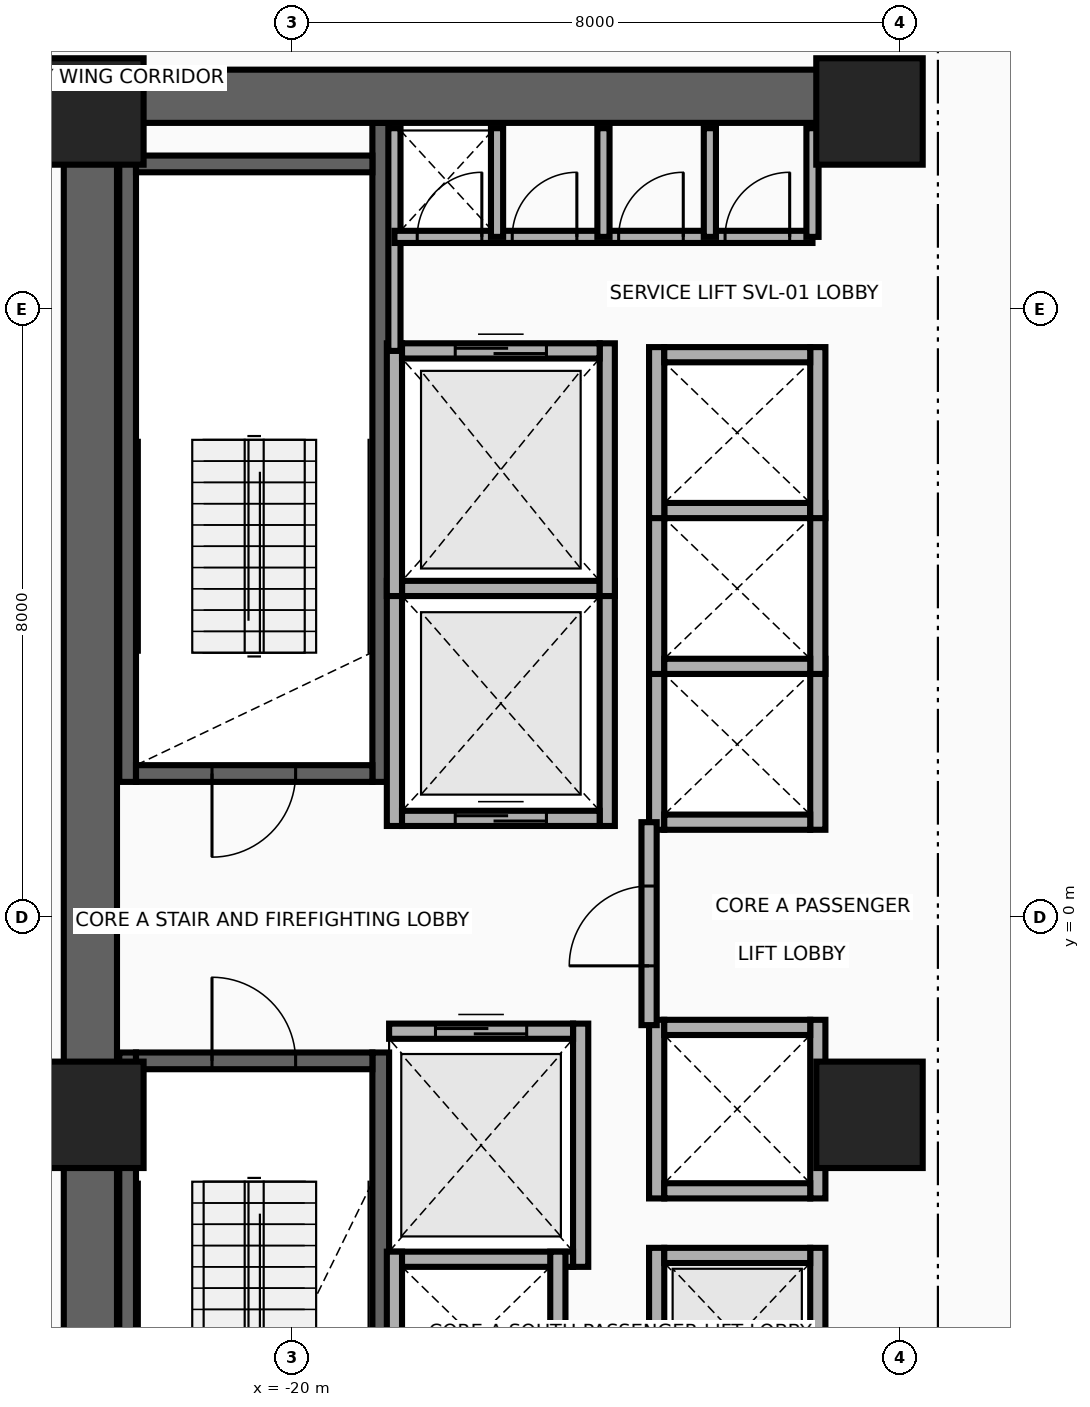
"""IFC4 building model, lengths in metres.
Left out: names, types, materials, properties, quantities, classifications, styles, units other than length and angle.
Written with IfcOpenShell. Run it as: python <this file> out.ifc"""

import sys

from ifc_helpers import new_model, si_unit, direction, frame, frame_2d, origin, origin_2d, place, context, subcontext, project, spatial, rectangle, extrude, source, transform, mapped, element, fill, save


model = new_model("IFC4")
c1 = context("Model", 3, precision=1e-05, world=origin(), true_north=direction((0.0, 1.0)))
c2 = subcontext(c1, "Body", "Model", "MODEL_VIEW")
j1 = project(units=[si_unit("LENGTHUNIT", "METRE"), si_unit("PLANEANGLEUNIT", "RADIAN")], contexts=[c1])
p1 = place(None, origin())
s1 = spatial("IfcSite", under=j1, at=p1, CompositionType="ELEMENT")
p2 = place(p1, origin())
s2 = spatial("IfcBuilding", under=s1, at=p2, CompositionType="ELEMENT")
p3 = place(p2, frame((0.0, 0.0, 63.0)))
s3 = spatial("IfcBuildingStorey", under=s2, at=p3, CompositionType="ELEMENT", Elevation=63.0)
for number, where, z_axis, x_axis in (
    (1, (-22.16, 1.78, 0.0), (0.0, 0.0, 1.0), (0.0, 1.0, 0.0)),
    (2, (-18.83, 1.78, 0.0), (0.0, 0.0, 1.0), (0.0, 1.0, 0.0)),
):
    element("IfcWall", number, at=place(p3, frame(where, z_axis=z_axis, x_axis=x_axis)), inside=s3, PredefinedType="SHEAR", context=c2, shape_type="SweptSolid", body=[
        extrude(rectangle(XDim=8.67, YDim=0.22, at=frame_2d((4.335, 0.0))), origin(), (0.0, 0.0, 1.0), 3.46),
    ])
p4 = place(p3, frame((-22.05, 1.89, 0.0), z_axis=(0.0, 0.0, 1.0), x_axis=(1.0, 0.0, 0.0)))
e3 = element("IfcWall", 3, at=p4, inside=s3, PredefinedType="SHEAR", context=c2, shape_type="SweptSolid", body=[
    extrude(rectangle(XDim=3.11, YDim=0.22, at=frame_2d((1.555, 0.0))), origin(), (0.0, 0.0, 1.0), 3.46),
])
p5 = place(p4, frame((1.0, 0.0, 0.0)))
e4 = element("IfcOpeningElement", 4, at=p5, cuts=e3, PredefinedType="OPENING", context=c2, shape_type="SweptSolid", body=[
    extrude(rectangle(XDim=1.1, YDim=2.15, at=frame_2d((0.55, 1.075))), frame((0.0, 0.125, 0.0), z_axis=(0.0, -1.0, 0.0), x_axis=(1.0, 0.0, 0.0)), (0.0, 0.0, 1.0), 0.25),
])
p6 = place(p3, frame((-22.05, 9.91, 0.0), z_axis=(0.0, 0.0, 1.0), x_axis=(1.0, 0.0, 0.0)))
e5 = element("IfcWall", 5, at=p6, inside=s3, PredefinedType="SHEAR", context=c2, shape_type="SweptSolid", body=[
    extrude(rectangle(XDim=3.11, YDim=0.22, at=frame_2d((1.555, 0.0))), origin(), (0.0, 0.0, 1.0), 3.46),
])
for number, where, z_axis, x_axis in (
    (6, (-22.16, -10.45, 0.0), (0.0, 0.0, 1.0), (0.0, 1.0, 0.0)),
    (7, (-18.83, -10.45, 0.0), (0.0, 0.0, 1.0), (0.0, 1.0, 0.0)),
):
    element("IfcWall", number, at=place(p3, frame(where, z_axis=z_axis, x_axis=x_axis)), inside=s3, PredefinedType="SHEAR", context=c2, shape_type="SweptSolid", body=[
        extrude(rectangle(XDim=8.67, YDim=0.22, at=frame_2d((4.335, 0.0))), origin(), (0.0, 0.0, 1.0), 3.46),
    ])
p7 = place(p3, frame((-22.05, -1.89, 0.0), z_axis=(0.0, 0.0, 1.0), x_axis=(1.0, 0.0, 0.0)))
e8 = element("IfcWall", 8, at=p7, inside=s3, PredefinedType="SHEAR", context=c2, shape_type="SweptSolid", body=[
    extrude(rectangle(XDim=3.11, YDim=0.22, at=frame_2d((1.555, 0.0))), origin(), (0.0, 0.0, 1.0), 3.46),
])
p8 = place(p7, frame((1.0, 0.0, 0.0)))
e9 = element("IfcOpeningElement", 9, at=p8, cuts=e8, PredefinedType="OPENING", context=c2, shape_type="SweptSolid", body=[
    extrude(rectangle(XDim=1.1, YDim=2.15, at=frame_2d((0.55, 1.075))), frame((0.0, 0.125, 0.0), z_axis=(0.0, -1.0, 0.0), x_axis=(1.0, 0.0, 0.0)), (0.0, 0.0, 1.0), 0.25),
])
p9 = place(p3, frame((-22.65, -11.15, 0.0), z_axis=(0.0, 0.0, 1.0), x_axis=(0.0, 1.0, 0.0)))
e10 = element("IfcWall", 10, at=p9, inside=s3, PredefinedType="SHEAR", context=c2, shape_type="SweptSolid", body=[
    extrude(rectangle(XDim=22.3, YDim=0.7, at=frame_2d((11.15, 0.0))), origin(), (0.0, 0.0, 1.0), 3.46),
])
p10 = place(p3, frame((-22.65, 10.8, 0.0), z_axis=(0.0, 0.0, 1.0), x_axis=(1.0, 0.0, 0.0)))
e11 = element("IfcWall", 11, at=p10, inside=s3, PredefinedType="SHEAR", context=c2, shape_type="SweptSolid", body=[
    extrude(rectangle(XDim=10.25, YDim=0.7, at=frame_2d((5.125, 0.0))), origin(), (0.0, 0.0, 1.0), 3.46),
])
m1 = source(origin(), c2, "Body", "SweptSolid", [
    extrude(rectangle(XDim=1.4, YDim=1.4, at=origin_2d()), origin(), (0.0, 0.0, 1.0), 3.7),
])
for number, where, z_axis, x_axis in (
    (12, (-22.65, -2.6, 0.0), (0.0, 0.0, 1.0), (1.0, 0.0, 0.0)),
    (13, (-12.4, -2.6, 0.0), (0.0, 0.0, 1.0), (1.0, 0.0, 0.0)),
    (14, (-22.65, 10.6, 0.0), (0.0, 0.0, 1.0), (1.0, 0.0, 0.0)),
    (15, (-12.4, 10.6, 0.0), (0.0, 0.0, 1.0), (1.0, 0.0, 0.0)),
):
    element("IfcColumn", number, at=place(p3, frame(where, z_axis=z_axis, x_axis=x_axis)), inside=s3, PredefinedType="COLUMN", context=c2, shape_type="MappedRepresentation", body=[
        mapped(m1, transform((0.0, 0.0, 0.0), x_axis=(1.0, 0.0, 0.0), y_axis=(0.0, 1.0, 0.0), z_axis=(0.0, 0.0, 1.0), scale=1.0)),
    ])
for number, where, z_axis, x_axis in (
    (16, (-18.65, 1.2, 0.0), (0.0, 0.0, 1.0), (0.0, 1.0, 0.0)),
    (17, (-15.85, 1.2, 0.0), (0.0, 0.0, 1.0), (0.0, 1.0, 0.0)),
):
    element("IfcWall", number, at=place(p3, frame(where, z_axis=z_axis, x_axis=x_axis)), inside=s3, PredefinedType="MOVABLE", context=c2, shape_type="SweptSolid", body=[
        extrude(rectangle(XDim=3.225, YDim=0.2, at=frame_2d((1.613, 0.0))), origin(), (0.0, 0.0, 1.0), 3.46),
    ])
p11 = place(p3, frame((-18.55, 1.3, 0.0), z_axis=(0.0, 0.0, 1.0), x_axis=(1.0, 0.0, 0.0)))
e18 = element("IfcWall", 18, at=p11, inside=s3, PredefinedType="MOVABLE", context=c2, shape_type="SweptSolid", body=[
    extrude(rectangle(XDim=2.6, YDim=0.2, at=frame_2d((1.3, 0.0))), origin(), (0.0, 0.0, 1.0), 3.46),
])
p12 = place(p11, frame((0.7, 0.0, 0.0)))
e19 = element("IfcOpeningElement", 19, at=p12, cuts=e18, PredefinedType="OPENING", context=c2, shape_type="SweptSolid", body=[
    extrude(rectangle(XDim=1.2, YDim=2.1, at=frame_2d((0.6, 1.05))), frame((0.0, 0.115, 0.0), z_axis=(0.0, -1.0, 0.0), x_axis=(1.0, 0.0, 0.0)), (0.0, 0.0, 1.0), 0.23),
])
p13 = place(p3, frame((-18.55, 4.325, 0.0), z_axis=(0.0, 0.0, 1.0), x_axis=(1.0, 0.0, 0.0)))
e20 = element("IfcWall", 20, at=p13, inside=s3, PredefinedType="MOVABLE", context=c2, shape_type="SweptSolid", body=[
    extrude(rectangle(XDim=2.6, YDim=0.2, at=frame_2d((1.3, 0.0))), origin(), (0.0, 0.0, 1.0), 3.46),
])
p14 = place(p3, frame((-16.2, -4.6, 0.0), z_axis=(0.0, 0.0, 1.0), x_axis=(0.0, 1.0, 0.0)))
e21 = element("IfcWall", 21, at=p14, inside=s3, PredefinedType="MOVABLE", context=c2, shape_type="SweptSolid", body=[
    extrude(rectangle(XDim=3.2, YDim=0.2, at=frame_2d((1.6, 0.0))), origin(), (0.0, 0.0, 1.0), 3.46),
])
p15 = place(p3, frame((-18.72, -4.5, 0.0), z_axis=(0.0, 0.0, 1.0), x_axis=(1.0, 0.0, 0.0)))
e22 = element("IfcWall", 22, at=p15, inside=s3, PredefinedType="MOVABLE", context=c2, shape_type="SweptSolid", body=[
    extrude(rectangle(XDim=2.42, YDim=0.2, at=frame_2d((1.21, 0.0))), origin(), (0.0, 0.0, 1.0), 3.46),
])
p16 = place(p3, frame((-18.72, -1.5, 0.0), z_axis=(0.0, 0.0, 1.0), x_axis=(1.0, 0.0, 0.0)))
e23 = element("IfcWall", 23, at=p16, inside=s3, PredefinedType="MOVABLE", context=c2, shape_type="SweptSolid", body=[
    extrude(rectangle(XDim=2.42, YDim=0.2, at=frame_2d((1.21, 0.0))), origin(), (0.0, 0.0, 1.0), 3.46),
])
p17 = place(p16, frame((0.61, 0.0, 0.0)))
e24 = element("IfcOpeningElement", 24, at=p17, cuts=e23, PredefinedType="OPENING", context=c2, shape_type="SweptSolid", body=[
    extrude(rectangle(XDim=1.2, YDim=2.1, at=frame_2d((0.6, 1.05))), frame((0.0, 0.115, 0.0), z_axis=(0.0, -1.0, 0.0), x_axis=(1.0, 0.0, 0.0)), (0.0, 0.0, 1.0), 0.23),
])
for number, where, z_axis, x_axis in (
    (25, (-18.65, 4.225, 0.0), (0.0, 0.0, 1.0), (0.0, 1.0, 0.0)),
    (26, (-15.85, 4.225, 0.0), (0.0, 0.0, 1.0), (0.0, 1.0, 0.0)),
):
    element("IfcWall", number, at=place(p3, frame(where, z_axis=z_axis, x_axis=x_axis)), inside=s3, PredefinedType="MOVABLE", context=c2, shape_type="SweptSolid", body=[
        extrude(rectangle(XDim=3.325, YDim=0.2, at=frame_2d((1.663, 0.0))), origin(), (0.0, 0.0, 1.0), 3.46),
    ])
p18 = place(p3, frame((-18.55, 7.45, 0.0), z_axis=(0.0, 0.0, 1.0), x_axis=(1.0, 0.0, 0.0)))
e27 = element("IfcWall", 27, at=p18, inside=s3, PredefinedType="MOVABLE", context=c2, shape_type="SweptSolid", body=[
    extrude(rectangle(XDim=2.6, YDim=0.2, at=frame_2d((1.3, 0.0))), origin(), (0.0, 0.0, 1.0), 3.46),
])
p19 = place(p18, frame((0.7, 0.0, 0.0)))
e28 = element("IfcOpeningElement", 28, at=p19, cuts=e27, PredefinedType="OPENING", context=c2, shape_type="SweptSolid", body=[
    extrude(rectangle(XDim=1.2, YDim=2.1, at=frame_2d((0.6, 1.05))), frame((0.0, 0.115, 0.0), z_axis=(0.0, -1.0, 0.0), x_axis=(1.0, 0.0, 0.0)), (0.0, 0.0, 1.0), 0.23),
])
for number, where, z_axis, x_axis in (
    (29, (-15.2, -6.7, 0.0), (0.0, 0.0, 1.0), (0.0, 1.0, 0.0)),
    (30, (-13.08, -6.7, 0.0), (0.0, 0.0, 1.0), (0.0, 1.0, 0.0)),
):
    element("IfcWall", number, at=place(p3, frame(where, z_axis=z_axis, x_axis=x_axis)), inside=s3, PredefinedType="MOVABLE", context=c2, shape_type="SweptSolid", body=[
        extrude(rectangle(XDim=2.35, YDim=0.2, at=frame_2d((1.175, 0.0))), origin(), (0.0, 0.0, 1.0), 3.46),
    ])
p20 = place(p3, frame((-15.1, -4.45, 0.0), z_axis=(0.0, 0.0, 1.0), x_axis=(1.0, 0.0, 0.0)))
e31 = element("IfcWall", 31, at=p20, inside=s3, PredefinedType="MOVABLE", context=c2, shape_type="SweptSolid", body=[
    extrude(rectangle(XDim=1.92, YDim=0.2, at=frame_2d((0.96, 0.0))), origin(), (0.0, 0.0, 1.0), 3.46),
])
for number, where, z_axis, x_axis in (
    (32, (-15.2, 1.15, 0.0), (0.0, 0.0, 1.0), (0.0, 1.0, 0.0)),
    (33, (-13.08, 1.15, 0.0), (0.0, 0.0, 1.0), (0.0, 1.0, 0.0)),
):
    element("IfcWall", number, at=place(p3, frame(where, z_axis=z_axis, x_axis=x_axis)), inside=s3, PredefinedType="MOVABLE", context=c2, shape_type="SweptSolid", body=[
        extrude(rectangle(XDim=2.25, YDim=0.2, at=frame_2d((1.125, 0.0))), origin(), (0.0, 0.0, 1.0), 3.46),
    ])
p21 = place(p3, frame((-15.1, 1.25, 0.0), z_axis=(0.0, 0.0, 1.0), x_axis=(1.0, 0.0, 0.0)))
e34 = element("IfcWall", 34, at=p21, inside=s3, PredefinedType="MOVABLE", context=c2, shape_type="SweptSolid", body=[
    extrude(rectangle(XDim=1.92, YDim=0.2, at=frame_2d((0.96, 0.0))), origin(), (0.0, 0.0, 1.0), 3.46),
])
for number, where, z_axis, x_axis in (
    (35, (-15.2, 3.2, 0.0), (0.0, 0.0, 1.0), (0.0, 1.0, 0.0)),
    (36, (-13.08, 3.2, 0.0), (0.0, 0.0, 1.0), (0.0, 1.0, 0.0)),
):
    element("IfcWall", number, at=place(p3, frame(where, z_axis=z_axis, x_axis=x_axis)), inside=s3, PredefinedType="MOVABLE", context=c2, shape_type="SweptSolid", body=[
        extrude(rectangle(XDim=2.25, YDim=0.2, at=frame_2d((1.125, 0.0))), origin(), (0.0, 0.0, 1.0), 3.46),
    ])
for number, where, z_axis, x_axis in (
    (37, (-15.1, 3.3, 0.0), (0.0, 0.0, 1.0), (1.0, 0.0, 0.0)),
    (38, (-15.1, 5.35, 0.0), (0.0, 0.0, 1.0), (1.0, 0.0, 0.0)),
):
    element("IfcWall", number, at=place(p3, frame(where, z_axis=z_axis, x_axis=x_axis)), inside=s3, PredefinedType="MOVABLE", context=c2, shape_type="SweptSolid", body=[
        extrude(rectangle(XDim=1.92, YDim=0.2, at=frame_2d((0.96, 0.0))), origin(), (0.0, 0.0, 1.0), 3.46),
    ])
for number, where, z_axis, x_axis in (
    (39, (-15.2, 5.25, 0.0), (0.0, 0.0, 1.0), (0.0, 1.0, 0.0)),
    (40, (-13.08, 5.25, 0.0), (0.0, 0.0, 1.0), (0.0, 1.0, 0.0)),
):
    element("IfcWall", number, at=place(p3, frame(where, z_axis=z_axis, x_axis=x_axis)), inside=s3, PredefinedType="MOVABLE", context=c2, shape_type="SweptSolid", body=[
        extrude(rectangle(XDim=2.25, YDim=0.2, at=frame_2d((1.125, 0.0))), origin(), (0.0, 0.0, 1.0), 3.46),
    ])
p22 = place(p3, frame((-15.1, 7.4, 0.0), z_axis=(0.0, 0.0, 1.0), x_axis=(1.0, 0.0, 0.0)))
e41 = element("IfcWall", 41, at=p22, inside=s3, PredefinedType="MOVABLE", context=c2, shape_type="SweptSolid", body=[
    extrude(rectangle(XDim=1.92, YDim=0.2, at=frame_2d((0.96, 0.0))), origin(), (0.0, 0.0, 1.0), 3.46),
])
for number, where, z_axis, x_axis in (
    (42, (-18.65, -6.7, 0.0), (0.0, 0.0, 1.0), (0.0, 1.0, 0.0)),
    (43, (-16.5, -6.7, 0.0), (0.0, 0.0, 1.0), (0.0, 1.0, 0.0)),
):
    element("IfcWall", number, at=place(p3, frame(where, z_axis=z_axis, x_axis=x_axis)), inside=s3, PredefinedType="MOVABLE", context=c2, shape_type="SweptSolid", body=[
        extrude(rectangle(XDim=2.3, YDim=0.2, at=frame_2d((1.15, 0.0))), origin(), (0.0, 0.0, 1.0), 3.46),
    ])
for number, where, z_axis, x_axis in (
    (44, (-15.2, -3.7, 0.0), (0.0, 0.0, 1.0), (0.0, 1.0, 0.0)),
    (45, (-13.08, -3.7, 0.0), (0.0, 0.0, 1.0), (0.0, 1.0, 0.0)),
):
    element("IfcWall", number, at=place(p3, frame(where, z_axis=z_axis, x_axis=x_axis)), inside=s3, PredefinedType="MOVABLE", context=c2, shape_type="SweptSolid", body=[
        extrude(rectangle(XDim=2.35, YDim=0.2, at=frame_2d((1.175, 0.0))), origin(), (0.0, 0.0, 1.0), 3.46),
    ])
for number, where, z_axis, x_axis in (
    (46, (-15.1, -3.6, 0.0), (0.0, 0.0, 1.0), (1.0, 0.0, 0.0)),
    (47, (-15.1, -1.45, 0.0), (0.0, 0.0, 1.0), (1.0, 0.0, 0.0)),
):
    element("IfcWall", number, at=place(p3, frame(where, z_axis=z_axis, x_axis=x_axis)), inside=s3, PredefinedType="MOVABLE", context=c2, shape_type="SweptSolid", body=[
        extrude(rectangle(XDim=1.92, YDim=0.2, at=frame_2d((0.96, 0.0))), origin(), (0.0, 0.0, 1.0), 3.46),
    ])
p23 = place(p3, frame((-15.3, -1.42, 0.0), z_axis=(0.0, 0.0, 1.0), x_axis=(0.0, 1.0, 0.0)))
e48 = element("IfcWall", 48, at=p23, inside=s3, PredefinedType="PARTITIONING", context=c2, shape_type="SweptSolid", body=[
    extrude(rectangle(XDim=2.67, YDim=0.2, at=frame_2d((1.335, 0.0))), origin(), (0.0, 0.0, 1.0), 3.46),
])
p24 = place(p23, frame((0.78, 0.0, 0.0)))
e49 = element("IfcOpeningElement", 49, at=p24, cuts=e48, PredefinedType="OPENING", context=c2, shape_type="SweptSolid", body=[
    extrude(rectangle(XDim=1.05, YDim=2.15, at=frame_2d((0.525, 1.075))), frame((0.0, 0.115, 0.0), z_axis=(0.0, -1.0, 0.0), x_axis=(1.0, 0.0, 0.0)), (0.0, 0.0, 1.0), 0.23),
])
p25 = place(p3, frame((-18.65, 7.45, 0.0), z_axis=(0.0, 0.0, 1.0), x_axis=(0.0, 1.0, 0.0)))
e50 = element("IfcWall", 50, at=p25, inside=s3, PredefinedType="PARTITIONING", context=c2, shape_type="SweptSolid", body=[
    extrude(rectangle(XDim=2.93, YDim=0.16, at=frame_2d((1.465, 0.0))), origin(), (0.0, 0.0, 1.0), 3.46),
])
p26 = place(p3, frame((-18.65, 8.95, 0.0), z_axis=(0.0, 0.0, 1.0), x_axis=(1.0, 0.0, 0.0)))
e51 = element("IfcWall", 51, at=p26, inside=s3, PredefinedType="PARTITIONING", context=c2, shape_type="SweptSolid", body=[
    extrude(rectangle(XDim=5.5, YDim=0.16, at=frame_2d((2.75, 0.0))), origin(), (0.0, 0.0, 1.0), 3.46),
])
p27 = place(p26, frame((0.3, 0.0, 0.0)))
e52 = element("IfcOpeningElement", 52, at=p27, cuts=e51, PredefinedType="OPENING", context=c2, shape_type="SweptSolid", body=[
    extrude(rectangle(XDim=0.85, YDim=2.05, at=frame_2d((0.425, 1.025))), frame((0.0, 0.095, 0.0), z_axis=(0.0, -1.0, 0.0), x_axis=(1.0, 0.0, 0.0)), (0.0, 0.0, 1.0), 0.19),
])
p28 = place(p26, frame((1.55, 0.0, 0.0)))
e53 = element("IfcOpeningElement", 53, at=p28, cuts=e51, PredefinedType="OPENING", context=c2, shape_type="SweptSolid", body=[
    extrude(rectangle(XDim=0.85, YDim=2.05, at=frame_2d((0.425, 1.025))), frame((0.0, 0.095, 0.0), z_axis=(0.0, -1.0, 0.0), x_axis=(1.0, 0.0, 0.0)), (0.0, 0.0, 1.0), 0.19),
])
p29 = place(p26, frame((2.95, 0.0, 0.0)))
e54 = element("IfcOpeningElement", 54, at=p29, cuts=e51, PredefinedType="OPENING", context=c2, shape_type="SweptSolid", body=[
    extrude(rectangle(XDim=0.85, YDim=2.05, at=frame_2d((0.425, 1.025))), frame((0.0, 0.095, 0.0), z_axis=(0.0, -1.0, 0.0), x_axis=(1.0, 0.0, 0.0)), (0.0, 0.0, 1.0), 0.19),
])
p30 = place(p26, frame((4.35, 0.0, 0.0)))
e55 = element("IfcOpeningElement", 55, at=p30, cuts=e51, PredefinedType="OPENING", context=c2, shape_type="SweptSolid", body=[
    extrude(rectangle(XDim=0.85, YDim=2.05, at=frame_2d((0.425, 1.025))), frame((0.0, 0.095, 0.0), z_axis=(0.0, -1.0, 0.0), x_axis=(1.0, 0.0, 0.0)), (0.0, 0.0, 1.0), 0.19),
])
for number, where, z_axis, x_axis in (
    (56, (-13.15, 8.95, 0.0), (0.0, 0.0, 1.0), (0.0, 1.0, 0.0)),
    (57, (-17.3, 8.95, 0.0), (0.0, 0.0, 1.0), (0.0, 1.0, 0.0)),
    (58, (-15.9, 8.95, 0.0), (0.0, 0.0, 1.0), (0.0, 1.0, 0.0)),
    (59, (-14.5, 8.95, 0.0), (0.0, 0.0, 1.0), (0.0, 1.0, 0.0)),
):
    element("IfcWall", number, at=place(p3, frame(where, z_axis=z_axis, x_axis=x_axis)), inside=s3, PredefinedType="PARTITIONING", context=c2, shape_type="SweptSolid", body=[
        extrude(rectangle(XDim=1.43, YDim=0.16, at=frame_2d((0.715, 0.0))), origin(), (0.0, 0.0, 1.0), 3.46),
    ])
p31 = place(p12, origin())
e60 = element("IfcDoor", 60, at=p31, inside=s3, OperationType="DOUBLE_DOOR_SLIDING", PredefinedType="DOOR", context=c2, shape_type="SweptSolid", body=[
    extrude(rectangle(XDim=1.2, YDim=2.1, at=frame_2d((0.6, 1.05))), frame((0.0, 0.025, 0.0), z_axis=(0.0, -1.0, 0.0), x_axis=(1.0, 0.0, 0.0)), (0.0, 0.0, 1.0), 0.05),
])
fill(e19, e60)
p32 = place(p17, origin())
e61 = element("IfcDoor", 61, at=p32, inside=s3, OperationType="DOUBLE_DOOR_SLIDING", PredefinedType="DOOR", context=c2, shape_type="SweptSolid", body=[
    extrude(rectangle(XDim=1.2, YDim=2.1, at=frame_2d((0.6, 1.05))), frame((0.0, 0.025, 0.0), z_axis=(0.0, -1.0, 0.0), x_axis=(1.0, 0.0, 0.0)), (0.0, 0.0, 1.0), 0.05),
])
fill(e24, e61)
p33 = place(p19, origin())
e62 = element("IfcDoor", 62, at=p33, inside=s3, OperationType="DOUBLE_DOOR_SLIDING", PredefinedType="DOOR", context=c2, shape_type="SweptSolid", body=[
    extrude(rectangle(XDim=1.2, YDim=2.1, at=frame_2d((0.6, 1.05))), frame((0.0, 0.025, 0.0), z_axis=(0.0, -1.0, 0.0), x_axis=(1.0, 0.0, 0.0)), (0.0, 0.0, 1.0), 0.05),
])
fill(e28, e62)
p34 = place(p24, origin())
e63 = element("IfcDoor", 63, at=p34, inside=s3, OperationType="SINGLE_SWING_RIGHT", PredefinedType="DOOR", context=c2, shape_type="SweptSolid", body=[
    extrude(rectangle(XDim=1.05, YDim=2.15, at=frame_2d((0.525, 1.075))), frame((0.0, 0.025, 0.0), z_axis=(0.0, -1.0, 0.0), x_axis=(1.0, 0.0, 0.0)), (0.0, 0.0, 1.0), 0.05),
])
fill(e49, e63)
p35 = place(p5, frame((1.1, 0.0, 0.0), z_axis=(0.0, 0.0, 1.0), x_axis=(-1.0, 0.0, 0.0)))
e64 = element("IfcDoor", 64, at=p35, inside=s3, OperationType="SINGLE_SWING_LEFT", PredefinedType="DOOR", context=c2, shape_type="SweptSolid", body=[
    extrude(rectangle(XDim=1.1, YDim=2.15, at=frame_2d((0.55, 1.075))), frame((0.0, 0.025, 0.0), z_axis=(0.0, -1.0, 0.0), x_axis=(1.0, 0.0, 0.0)), (0.0, 0.0, 1.0), 0.05),
])
fill(e4, e64)
p36 = place(p8, origin())
e65 = element("IfcDoor", 65, at=p36, inside=s3, OperationType="SINGLE_SWING_RIGHT", PredefinedType="DOOR", context=c2, shape_type="SweptSolid", body=[
    extrude(rectangle(XDim=1.1, YDim=2.15, at=frame_2d((0.55, 1.075))), frame((0.0, 0.025, 0.0), z_axis=(0.0, -1.0, 0.0), x_axis=(1.0, 0.0, 0.0)), (0.0, 0.0, 1.0), 0.05),
])
fill(e9, e65)
p37 = place(p27, origin())
e66 = element("IfcDoor", 66, at=p37, inside=s3, OperationType="SINGLE_SWING_LEFT", PredefinedType="DOOR", context=c2, shape_type="SweptSolid", body=[
    extrude(rectangle(XDim=0.85, YDim=2.05, at=frame_2d((0.425, 1.025))), frame((0.0, 0.025, 0.0), z_axis=(0.0, -1.0, 0.0), x_axis=(1.0, 0.0, 0.0)), (0.0, 0.0, 1.0), 0.05),
])
fill(e52, e66)
p38 = place(p28, origin())
e67 = element("IfcDoor", 67, at=p38, inside=s3, OperationType="SINGLE_SWING_RIGHT", PredefinedType="DOOR", context=c2, shape_type="SweptSolid", body=[
    extrude(rectangle(XDim=0.85, YDim=2.05, at=frame_2d((0.425, 1.025))), frame((0.0, 0.025, 0.0), z_axis=(0.0, -1.0, 0.0), x_axis=(1.0, 0.0, 0.0)), (0.0, 0.0, 1.0), 0.05),
])
fill(e53, e67)
p39 = place(p29, origin())
e68 = element("IfcDoor", 68, at=p39, inside=s3, OperationType="SINGLE_SWING_LEFT", PredefinedType="DOOR", context=c2, shape_type="SweptSolid", body=[
    extrude(rectangle(XDim=0.85, YDim=2.05, at=frame_2d((0.425, 1.025))), frame((0.0, 0.025, 0.0), z_axis=(0.0, -1.0, 0.0), x_axis=(1.0, 0.0, 0.0)), (0.0, 0.0, 1.0), 0.05),
])
fill(e54, e68)
p40 = place(p30, origin())
e69 = element("IfcDoor", 69, at=p40, inside=s3, OperationType="SINGLE_SWING_RIGHT", PredefinedType="DOOR", context=c2, shape_type="SweptSolid", body=[
    extrude(rectangle(XDim=0.85, YDim=2.05, at=frame_2d((0.425, 1.025))), frame((0.0, 0.025, 0.0), z_axis=(0.0, -1.0, 0.0), x_axis=(1.0, 0.0, 0.0)), (0.0, 0.0, 1.0), 0.05),
])
fill(e55, e69)
save(model, sys.argv[1])
